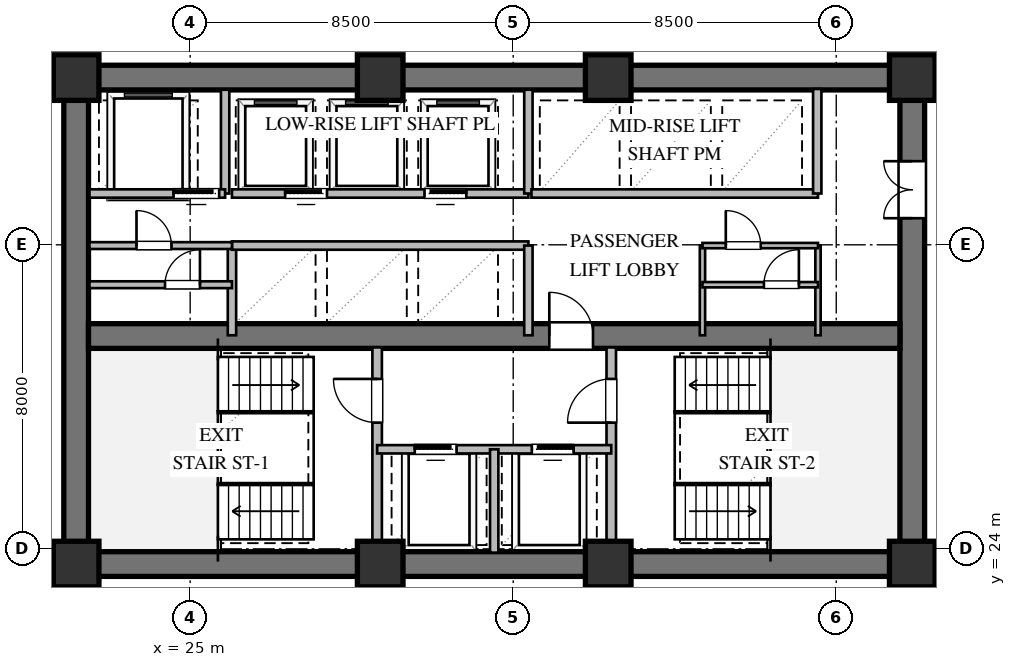
"""IFC4 building model, lengths in metres.
Left out: names, types, materials, properties, quantities, classifications, styles, units other than length and angle.
Written with IfcOpenShell. Run it as: python <this file> out.ifc"""

import sys

from ifc_helpers import new_model, si_unit, direction, frame, frame_2d, origin, origin_2d, place, context, subcontext, project, spatial, rectangle, extrude, element, fill, save


model = new_model("IFC4")
c1 = context("Model", 3, precision=1e-05, world=origin(), true_north=direction((0.0, 1.0)))
c2 = subcontext(c1, "Body", "Model", "MODEL_VIEW")
j1 = project(units=[si_unit("LENGTHUNIT", "METRE"), si_unit("PLANEANGLEUNIT", "RADIAN")], contexts=[c1])
p1 = place(None, origin())
s1 = spatial("IfcSite", under=j1, at=p1, CompositionType="ELEMENT")
p2 = place(p1, origin())
s2 = spatial("IfcBuilding", under=s1, at=p2, CompositionType="ELEMENT")
p3 = place(p2, frame((0.0, 0.0, 67.2)))
s3 = spatial("IfcBuildingStorey", under=s2, at=p3, CompositionType="ELEMENT", Elevation=67.2)
for number, where, z_axis, x_axis in (
    (1, (21.675, 23.6, 0.0), (0.0, 0.0, 1.0), (1.0, 0.0, 0.0)),
    (2, (21.675, 36.4, 0.0), (0.0, 0.0, 1.0), (1.0, 0.0, 0.0)),
):
    element("IfcWall", number, at=place(p3, frame(where, z_axis=z_axis, x_axis=x_axis)), inside=s3, PredefinedType="SHEAR", context=c2, shape_type="SweptSolid", body=[
        extrude(rectangle(XDim=22.65, YDim=0.65, at=frame_2d((11.325, 0.0))), origin(), (0.0, 0.0, 1.0), 3.36),
    ])
p4 = place(p3, frame((22.0, 23.925, 0.0), z_axis=(0.0, 0.0, 1.0), x_axis=(0.0, 1.0, 0.0)))
e3 = element("IfcWall", 3, at=p4, inside=s3, PredefinedType="SHEAR", context=c2, shape_type="SweptSolid", body=[
    extrude(rectangle(XDim=12.15, YDim=0.65, at=frame_2d((6.075, 0.0))), origin(), (0.0, 0.0, 1.0), 3.36),
])
p5 = place(p3, frame((44.0, 23.925, 0.0), z_axis=(0.0, 0.0, 1.0), x_axis=(0.0, 1.0, 0.0)))
e4 = element("IfcWall", 4, at=p5, inside=s3, PredefinedType="SHEAR", context=c2, shape_type="SweptSolid", body=[
    extrude(rectangle(XDim=12.15, YDim=0.65, at=frame_2d((6.075, 0.0))), origin(), (0.0, 0.0, 1.0), 3.36),
])
p6 = place(p5, frame((8.775, 0.0, 0.0)))
e5 = element("IfcOpeningElement", 5, at=p6, cuts=e4, PredefinedType="OPENING", context=c2, shape_type="SweptSolid", body=[
    extrude(rectangle(XDim=1.5, YDim=2.15, at=frame_2d((0.75, 1.075))), frame((0.0, 0.335, 0.0), z_axis=(0.0, -1.0, 0.0), x_axis=(1.0, 0.0, 0.0)), (0.0, 0.0, 1.0), 0.67),
])
p7 = place(p3, frame((22.325, 29.6, 0.0), z_axis=(0.0, 0.0, 1.0), x_axis=(1.0, 0.0, 0.0)))
e6 = element("IfcWall", 6, at=p7, inside=s3, PredefinedType="SHEAR", context=c2, shape_type="SweptSolid", body=[
    extrude(rectangle(XDim=21.35, YDim=0.65, at=frame_2d((10.675, 0.0))), origin(), (0.0, 0.0, 1.0), 3.36),
])
p8 = place(p7, frame((12.125, 0.0, 0.0)))
e7 = element("IfcOpeningElement", 7, at=p8, cuts=e6, PredefinedType="OPENING", context=c2, shape_type="SweptSolid", body=[
    extrude(rectangle(XDim=1.15, YDim=2.1, at=frame_2d((0.575, 1.05))), frame((0.0, 0.335, 0.0), z_axis=(0.0, -1.0, 0.0), x_axis=(1.0, 0.0, 0.0)), (0.0, 0.0, 1.0), 0.67),
])
for number, where, z_axis, x_axis in (
    (8, (22.0, 23.6, 0.0), (0.0, 0.0, 1.0), (1.0, 0.0, 0.0)),
    (9, (30.0, 23.6, 0.0), (0.0, 0.0, 1.0), (1.0, 0.0, 0.0)),
    (10, (36.0, 23.6, 0.0), (0.0, 0.0, 1.0), (1.0, 0.0, 0.0)),
    (11, (44.0, 23.6, 0.0), (0.0, 0.0, 1.0), (1.0, 0.0, 0.0)),
    (12, (44.0, 36.4, 0.0), (0.0, 0.0, 1.0), (1.0, 0.0, 0.0)),
    (13, (36.0, 36.4, 0.0), (0.0, 0.0, 1.0), (1.0, 0.0, 0.0)),
    (14, (30.0, 36.4, 0.0), (0.0, 0.0, 1.0), (1.0, 0.0, 0.0)),
    (15, (22.0, 36.4, 0.0), (0.0, 0.0, 1.0), (1.0, 0.0, 0.0)),
):
    element("IfcColumn", number, at=place(p3, frame(where, z_axis=z_axis, x_axis=x_axis)), inside=s3, PredefinedType="COLUMN", context=c2, shape_type="SweptSolid", body=[
        extrude(rectangle(XDim=1.2, YDim=1.2, at=origin_2d()), origin(), (0.0, 0.0, 1.0), 3.6),
    ])
p9 = place(p3, frame((29.92, 23.9, 0.0), z_axis=(0.0, 0.0, 1.0), x_axis=(0.0, 1.0, 0.0)))
e16 = element("IfcWall", 16, at=p9, inside=s3, PredefinedType="SOLIDWALL", context=c2, shape_type="SweptSolid", body=[
    extrude(rectangle(XDim=5.4, YDim=0.25, at=frame_2d((2.7, 0.0))), origin(), (0.0, 0.0, 1.0), 3.36),
])
p10 = place(p9, frame((3.421, 0.0, 0.0)))
e17 = element("IfcOpeningElement", 17, at=p10, cuts=e16, PredefinedType="OPENING", context=c2, shape_type="SweptSolid", body=[
    extrude(rectangle(XDim=1.15, YDim=2.1, at=frame_2d((0.575, 1.05))), frame((0.0, 0.135, 0.0), z_axis=(0.0, -1.0, 0.0), x_axis=(1.0, 0.0, 0.0)), (0.0, 0.0, 1.0), 0.27),
])
p11 = place(p3, frame((36.08, 23.9, 0.0), z_axis=(0.0, 0.0, 1.0), x_axis=(0.0, 1.0, 0.0)))
e18 = element("IfcWall", 18, at=p11, inside=s3, PredefinedType="SOLIDWALL", context=c2, shape_type="SweptSolid", body=[
    extrude(rectangle(XDim=5.4, YDim=0.25, at=frame_2d((2.7, 0.0))), origin(), (0.0, 0.0, 1.0), 3.36),
])
p12 = place(p11, frame((3.421, 0.0, 0.0)))
e19 = element("IfcOpeningElement", 19, at=p12, cuts=e18, PredefinedType="OPENING", context=c2, shape_type="SweptSolid", body=[
    extrude(rectangle(XDim=1.15, YDim=2.1, at=frame_2d((0.575, 1.05))), frame((0.0, 0.135, 0.0), z_axis=(0.0, -1.0, 0.0), x_axis=(1.0, 0.0, 0.0)), (0.0, 0.0, 1.0), 0.27),
])
p13 = place(p3, frame((29.92, 26.62, 0.0), z_axis=(0.0, 0.0, 1.0), x_axis=(1.0, 0.0, 0.0)))
e20 = element("IfcWall", 20, at=p13, inside=s3, PredefinedType="SOLIDWALL", context=c2, shape_type="SweptSolid", body=[
    extrude(rectangle(XDim=6.16, YDim=0.22, at=frame_2d((3.08, 0.0))), origin(), (0.0, 0.0, 1.0), 3.36),
])
p14 = place(p13, frame((0.99, 0.0, 0.0)))
e21 = element("IfcOpeningElement", 21, at=p14, cuts=e20, PredefinedType="OPENING", context=c2, shape_type="SweptSolid", body=[
    extrude(rectangle(XDim=1.1, YDim=2.1, at=frame_2d((0.55, 1.05))), frame((0.0, 0.12, 0.0), z_axis=(0.0, -1.0, 0.0), x_axis=(1.0, 0.0, 0.0)), (0.0, 0.0, 1.0), 0.24),
])
p15 = place(p13, frame((4.07, 0.0, 0.0)))
e22 = element("IfcOpeningElement", 22, at=p15, cuts=e20, PredefinedType="OPENING", context=c2, shape_type="SweptSolid", body=[
    extrude(rectangle(XDim=1.1, YDim=2.1, at=frame_2d((0.55, 1.05))), frame((0.0, 0.12, 0.0), z_axis=(0.0, -1.0, 0.0), x_axis=(1.0, 0.0, 0.0)), (0.0, 0.0, 1.0), 0.24),
])
p16 = place(p3, frame((33.0, 23.9, 0.0), z_axis=(0.0, 0.0, 1.0), x_axis=(0.0, 1.0, 0.0)))
e23 = element("IfcWall", 23, at=p16, inside=s3, PredefinedType="SOLIDWALL", context=c2, shape_type="SweptSolid", body=[
    extrude(rectangle(XDim=2.72, YDim=0.22, at=frame_2d((1.36, 0.0))), origin(), (0.0, 0.0, 1.0), 3.36),
])
p17 = place(p3, frame((25.92, 33.35, 0.0), z_axis=(0.0, 0.0, 1.0), x_axis=(0.0, 1.0, 0.0)))
e24 = element("IfcWall", 24, at=p17, inside=s3, PredefinedType="SOLIDWALL", context=c2, shape_type="SweptSolid", body=[
    extrude(rectangle(XDim=2.73, YDim=0.22, at=frame_2d((1.365, 0.0))), origin(), (0.0, 0.0, 1.0), 3.36),
])
p18 = place(p3, frame((22.35, 33.35, 0.0), z_axis=(0.0, 0.0, 1.0), x_axis=(1.0, 0.0, 0.0)))
e25 = element("IfcWall", 25, at=p18, inside=s3, PredefinedType="SOLIDWALL", context=c2, shape_type="SweptSolid", body=[
    extrude(rectangle(XDim=3.57, YDim=0.22, at=frame_2d((1.785, 0.0))), origin(), (0.0, 0.0, 1.0), 3.36),
])
p19 = place(p18, frame((2.213, 0.0, 0.0)))
e26 = element("IfcOpeningElement", 26, at=p19, cuts=e25, PredefinedType="OPENING", context=c2, shape_type="SweptSolid", body=[
    extrude(rectangle(XDim=1.2, YDim=2.1, at=frame_2d((0.6, 1.05))), frame((0.0, 0.12, 0.0), z_axis=(0.0, -1.0, 0.0), x_axis=(1.0, 0.0, 0.0)), (0.0, 0.0, 1.0), 0.24),
])
p20 = place(p3, frame((26.1, 29.62, 0.0), z_axis=(0.0, 0.0, 1.0), x_axis=(0.0, 1.0, 0.0)))
e27 = element("IfcWall", 27, at=p20, inside=s3, PredefinedType="SOLIDWALL", context=c2, shape_type="SweptSolid", body=[
    extrude(rectangle(XDim=2.36, YDim=0.22, at=frame_2d((1.18, 0.0))), origin(), (0.0, 0.0, 1.0), 3.36),
])
p21 = place(p3, frame((26.1, 31.98, 0.0), z_axis=(0.0, 0.0, 1.0), x_axis=(1.0, 0.0, 0.0)))
e28 = element("IfcWall", 28, at=p21, inside=s3, PredefinedType="SOLIDWALL", context=c2, shape_type="SweptSolid", body=[
    extrude(rectangle(XDim=7.8, YDim=0.22, at=frame_2d((3.9, 0.0))), origin(), (0.0, 0.0, 1.0), 3.36),
])
p22 = place(p3, frame((33.9, 29.62, 0.0), z_axis=(0.0, 0.0, 1.0), x_axis=(0.0, 1.0, 0.0)))
e29 = element("IfcWall", 29, at=p22, inside=s3, PredefinedType="SOLIDWALL", context=c2, shape_type="SweptSolid", body=[
    extrude(rectangle(XDim=2.36, YDim=0.22, at=frame_2d((1.18, 0.0))), origin(), (0.0, 0.0, 1.0), 3.36),
])
p23 = place(p3, frame((26.1, 33.35, 0.0), z_axis=(0.0, 0.0, 1.0), x_axis=(1.0, 0.0, 0.0)))
e30 = element("IfcWall", 30, at=p23, inside=s3, PredefinedType="SOLIDWALL", context=c2, shape_type="SweptSolid", body=[
    extrude(rectangle(XDim=7.8, YDim=0.22, at=frame_2d((3.9, 0.0))), origin(), (0.0, 0.0, 1.0), 3.36),
])
p24 = place(p23, frame((1.4, 0.0, 0.0)))
e31 = element("IfcOpeningElement", 31, at=p24, cuts=e30, PredefinedType="OPENING", context=c2, shape_type="SweptSolid", body=[
    extrude(rectangle(XDim=1.1, YDim=2.1, at=frame_2d((0.55, 1.05))), frame((0.0, 0.12, 0.0), z_axis=(0.0, -1.0, 0.0), x_axis=(1.0, 0.0, 0.0)), (0.0, 0.0, 1.0), 0.24),
])
p25 = place(p23, frame((5.066, 0.0, 0.0)))
e32 = element("IfcOpeningElement", 32, at=p25, cuts=e30, PredefinedType="OPENING", context=c2, shape_type="SweptSolid", body=[
    extrude(rectangle(XDim=1.1, YDim=2.1, at=frame_2d((0.55, 1.05))), frame((0.0, 0.12, 0.0), z_axis=(0.0, -1.0, 0.0), x_axis=(1.0, 0.0, 0.0)), (0.0, 0.0, 1.0), 0.24),
])
p26 = place(p3, frame((33.9, 33.35, 0.0), z_axis=(0.0, 0.0, 1.0), x_axis=(0.0, 1.0, 0.0)))
e33 = element("IfcWall", 33, at=p26, inside=s3, PredefinedType="SOLIDWALL", context=c2, shape_type="SweptSolid", body=[
    extrude(rectangle(XDim=2.73, YDim=0.22, at=frame_2d((1.365, 0.0))), origin(), (0.0, 0.0, 1.0), 3.36),
])
p27 = place(p3, frame((33.98, 33.35, 0.0), z_axis=(0.0, 0.0, 1.0), x_axis=(1.0, 0.0, 0.0)))
e34 = element("IfcWall", 34, at=p27, inside=s3, PredefinedType="SOLIDWALL", context=c2, shape_type="SweptSolid", body=[
    extrude(rectangle(XDim=7.54, YDim=0.22, at=frame_2d((3.77, 0.0))), origin(), (0.0, 0.0, 1.0), 3.36),
])
p28 = place(p3, frame((41.5, 33.35, 0.0), z_axis=(0.0, 0.0, 1.0), x_axis=(0.0, 1.0, 0.0)))
e35 = element("IfcWall", 35, at=p28, inside=s3, PredefinedType="SOLIDWALL", context=c2, shape_type="SweptSolid", body=[
    extrude(rectangle(XDim=2.75, YDim=0.22, at=frame_2d((1.375, 0.0))), origin(), (0.0, 0.0, 1.0), 3.36),
])
p29 = place(p3, frame((22.35, 30.95, 0.0), z_axis=(0.0, 0.0, 1.0), x_axis=(1.0, 0.0, 0.0)))
e36 = element("IfcWall", 36, at=p29, inside=s3, PredefinedType="PARTITIONING", context=c2, shape_type="SweptSolid", body=[
    extrude(rectangle(XDim=3.75, YDim=0.18, at=frame_2d((1.875, 0.0))), origin(), (0.0, 0.0, 1.0), 3.36),
])
p30 = place(p29, frame((1.988, 0.0, 0.0)))
e37 = element("IfcOpeningElement", 37, at=p30, cuts=e36, PredefinedType="OPENING", context=c2, shape_type="SweptSolid", body=[
    extrude(rectangle(XDim=0.92, YDim=2.1, at=frame_2d((0.46, 1.05))), frame((0.0, 0.1, 0.0), z_axis=(0.0, -1.0, 0.0), x_axis=(1.0, 0.0, 0.0)), (0.0, 0.0, 1.0), 0.2),
])
p31 = place(p3, frame((22.35, 31.98, 0.0), z_axis=(0.0, 0.0, 1.0), x_axis=(1.0, 0.0, 0.0)))
e38 = element("IfcWall", 38, at=p31, inside=s3, PredefinedType="PARTITIONING", context=c2, shape_type="SweptSolid", body=[
    extrude(rectangle(XDim=3.75, YDim=0.18, at=frame_2d((1.875, 0.0))), origin(), (0.0, 0.0, 1.0), 3.36),
])
p32 = place(p31, frame((1.238, 0.0, 0.0)))
e39 = element("IfcOpeningElement", 39, at=p32, cuts=e38, PredefinedType="OPENING", context=c2, shape_type="SweptSolid", body=[
    extrude(rectangle(XDim=0.92, YDim=2.1, at=frame_2d((0.46, 1.05))), frame((0.0, 0.1, 0.0), z_axis=(0.0, -1.0, 0.0), x_axis=(1.0, 0.0, 0.0)), (0.0, 0.0, 1.0), 0.2),
])
for number, where, z_axis, x_axis in (
    (40, (38.48, 29.62, 0.0), (0.0, 0.0, 1.0), (0.0, 1.0, 0.0)),
    (41, (41.52, 29.62, 0.0), (0.0, 0.0, 1.0), (0.0, 1.0, 0.0)),
):
    element("IfcWall", number, at=place(p3, frame(where, z_axis=z_axis, x_axis=x_axis)), inside=s3, PredefinedType="PARTITIONING", context=c2, shape_type="SweptSolid", body=[
        extrude(rectangle(XDim=2.36, YDim=0.14, at=frame_2d((1.18, 0.0))), origin(), (0.0, 0.0, 1.0), 3.36),
    ])
p33 = place(p3, frame((38.48, 30.95, 0.0), z_axis=(0.0, 0.0, 1.0), x_axis=(1.0, 0.0, 0.0)))
e42 = element("IfcWall", 42, at=p33, inside=s3, PredefinedType="PARTITIONING", context=c2, shape_type="SweptSolid", body=[
    extrude(rectangle(XDim=3.04, YDim=0.14, at=frame_2d((1.52, 0.0))), origin(), (0.0, 0.0, 1.0), 3.36),
])
p34 = place(p33, frame((1.617, 0.0, 0.0)))
e43 = element("IfcOpeningElement", 43, at=p34, cuts=e42, PredefinedType="OPENING", context=c2, shape_type="SweptSolid", body=[
    extrude(rectangle(XDim=0.92, YDim=2.1, at=frame_2d((0.46, 1.05))), frame((0.0, 0.08, 0.0), z_axis=(0.0, -1.0, 0.0), x_axis=(1.0, 0.0, 0.0)), (0.0, 0.0, 1.0), 0.16),
])
p35 = place(p3, frame((38.48, 31.98, 0.0), z_axis=(0.0, 0.0, 1.0), x_axis=(1.0, 0.0, 0.0)))
e44 = element("IfcWall", 44, at=p35, inside=s3, PredefinedType="PARTITIONING", context=c2, shape_type="SweptSolid", body=[
    extrude(rectangle(XDim=3.04, YDim=0.14, at=frame_2d((1.52, 0.0))), origin(), (0.0, 0.0, 1.0), 3.36),
])
p36 = place(p35, frame((0.614, 0.0, 0.0)))
e45 = element("IfcOpeningElement", 45, at=p36, cuts=e44, PredefinedType="OPENING", context=c2, shape_type="SweptSolid", body=[
    extrude(rectangle(XDim=0.92, YDim=2.1, at=frame_2d((0.46, 1.05))), frame((0.0, 0.08, 0.0), z_axis=(0.0, -1.0, 0.0), x_axis=(1.0, 0.0, 0.0)), (0.0, 0.0, 1.0), 0.16),
])
p37 = place(p10, origin())
e46 = element("IfcDoor", 46, at=p37, inside=s3, OperationType="SINGLE_SWING_RIGHT", PredefinedType="DOOR", context=c2, shape_type="SweptSolid", body=[
    extrude(rectangle(XDim=1.15, YDim=2.1, at=frame_2d((0.575, 1.05))), frame((0.0, 0.025, 0.0), z_axis=(0.0, -1.0, 0.0), x_axis=(1.0, 0.0, 0.0)), (0.0, 0.0, 1.0), 0.05),
])
fill(e17, e46)
p38 = place(p12, origin())
e47 = element("IfcDoor", 47, at=p38, inside=s3, OperationType="SINGLE_SWING_LEFT", PredefinedType="DOOR", context=c2, shape_type="SweptSolid", body=[
    extrude(rectangle(XDim=1.15, YDim=2.1, at=frame_2d((0.575, 1.05))), frame((0.0, 0.025, 0.0), z_axis=(0.0, -1.0, 0.0), x_axis=(1.0, 0.0, 0.0)), (0.0, 0.0, 1.0), 0.05),
])
fill(e19, e47)
p39 = place(p14, origin())
e48 = element("IfcDoor", 48, at=p39, inside=s3, OperationType="SLIDING_TO_LEFT", PredefinedType="DOOR", context=c2, shape_type="SweptSolid", body=[
    extrude(rectangle(XDim=1.1, YDim=2.1, at=frame_2d((0.55, 1.05))), frame((0.0, 0.025, 0.0), z_axis=(0.0, -1.0, 0.0), x_axis=(1.0, 0.0, 0.0)), (0.0, 0.0, 1.0), 0.05),
])
fill(e21, e48)
p40 = place(p15, origin())
e49 = element("IfcDoor", 49, at=p40, inside=s3, OperationType="SLIDING_TO_RIGHT", PredefinedType="DOOR", context=c2, shape_type="SweptSolid", body=[
    extrude(rectangle(XDim=1.1, YDim=2.1, at=frame_2d((0.55, 1.05))), frame((0.0, 0.025, 0.0), z_axis=(0.0, -1.0, 0.0), x_axis=(1.0, 0.0, 0.0)), (0.0, 0.0, 1.0), 0.05),
])
fill(e22, e49)
p41 = place(p8, origin())
e50 = element("IfcDoor", 50, at=p41, inside=s3, OperationType="SINGLE_SWING_LEFT", PredefinedType="DOOR", context=c2, shape_type="SweptSolid", body=[
    extrude(rectangle(XDim=1.15, YDim=2.1, at=frame_2d((0.575, 1.05))), frame((0.0, 0.025, 0.0), z_axis=(0.0, -1.0, 0.0), x_axis=(1.0, 0.0, 0.0)), (0.0, 0.0, 1.0), 0.05),
])
fill(e7, e50)
p42 = place(p6, origin())
e51 = element("IfcDoor", 51, at=p42, inside=s3, OperationType="DOUBLE_DOOR_SINGLE_SWING", PredefinedType="DOOR", context=c2, shape_type="SweptSolid", body=[
    extrude(rectangle(XDim=1.5, YDim=2.15, at=frame_2d((0.75, 1.075))), frame((0.0, 0.025, 0.0), z_axis=(0.0, -1.0, 0.0), x_axis=(1.0, 0.0, 0.0)), (0.0, 0.0, 1.0), 0.05),
])
fill(e5, e51)
p43 = place(p19, origin())
e52 = element("IfcDoor", 52, at=p43, inside=s3, OperationType="SLIDING_TO_LEFT", PredefinedType="DOOR", context=c2, shape_type="SweptSolid", body=[
    extrude(rectangle(XDim=1.2, YDim=2.1, at=frame_2d((0.6, 1.05))), frame((0.0, 0.025, 0.0), z_axis=(0.0, -1.0, 0.0), x_axis=(1.0, 0.0, 0.0)), (0.0, 0.0, 1.0), 0.05),
])
fill(e26, e52)
p44 = place(p24, origin())
e53 = element("IfcDoor", 53, at=p44, inside=s3, OperationType="SLIDING_TO_LEFT", PredefinedType="DOOR", context=c2, shape_type="SweptSolid", body=[
    extrude(rectangle(XDim=1.1, YDim=2.1, at=frame_2d((0.55, 1.05))), frame((0.0, 0.025, 0.0), z_axis=(0.0, -1.0, 0.0), x_axis=(1.0, 0.0, 0.0)), (0.0, 0.0, 1.0), 0.05),
])
fill(e31, e53)
p45 = place(p25, origin())
e54 = element("IfcDoor", 54, at=p45, inside=s3, OperationType="SLIDING_TO_RIGHT", PredefinedType="DOOR", context=c2, shape_type="SweptSolid", body=[
    extrude(rectangle(XDim=1.1, YDim=2.1, at=frame_2d((0.55, 1.05))), frame((0.0, 0.025, 0.0), z_axis=(0.0, -1.0, 0.0), x_axis=(1.0, 0.0, 0.0)), (0.0, 0.0, 1.0), 0.05),
])
fill(e32, e54)
p46 = place(p32, origin())
e55 = element("IfcDoor", 55, at=p46, inside=s3, OperationType="SINGLE_SWING_LEFT", PredefinedType="DOOR", context=c2, shape_type="SweptSolid", body=[
    extrude(rectangle(XDim=0.92, YDim=2.1, at=frame_2d((0.46, 1.05))), frame((0.0, 0.025, 0.0), z_axis=(0.0, -1.0, 0.0), x_axis=(1.0, 0.0, 0.0)), (0.0, 0.0, 1.0), 0.05),
])
fill(e39, e55)
p47 = place(p30, origin())
e56 = element("IfcDoor", 56, at=p47, inside=s3, OperationType="SINGLE_SWING_RIGHT", PredefinedType="DOOR", context=c2, shape_type="SweptSolid", body=[
    extrude(rectangle(XDim=0.92, YDim=2.1, at=frame_2d((0.46, 1.05))), frame((0.0, 0.025, 0.0), z_axis=(0.0, -1.0, 0.0), x_axis=(1.0, 0.0, 0.0)), (0.0, 0.0, 1.0), 0.05),
])
fill(e37, e56)
p48 = place(p36, origin())
e57 = element("IfcDoor", 57, at=p48, inside=s3, OperationType="SINGLE_SWING_LEFT", PredefinedType="DOOR", context=c2, shape_type="SweptSolid", body=[
    extrude(rectangle(XDim=0.92, YDim=2.1, at=frame_2d((0.46, 1.05))), frame((0.0, 0.025, 0.0), z_axis=(0.0, -1.0, 0.0), x_axis=(1.0, 0.0, 0.0)), (0.0, 0.0, 1.0), 0.05),
])
fill(e45, e57)
p49 = place(p34, origin())
e58 = element("IfcDoor", 58, at=p49, inside=s3, OperationType="SINGLE_SWING_RIGHT", PredefinedType="DOOR", context=c2, shape_type="SweptSolid", body=[
    extrude(rectangle(XDim=0.92, YDim=2.1, at=frame_2d((0.46, 1.05))), frame((0.0, 0.025, 0.0), z_axis=(0.0, -1.0, 0.0), x_axis=(1.0, 0.0, 0.0)), (0.0, 0.0, 1.0), 0.05),
])
fill(e43, e58)
save(model, sys.argv[1])
